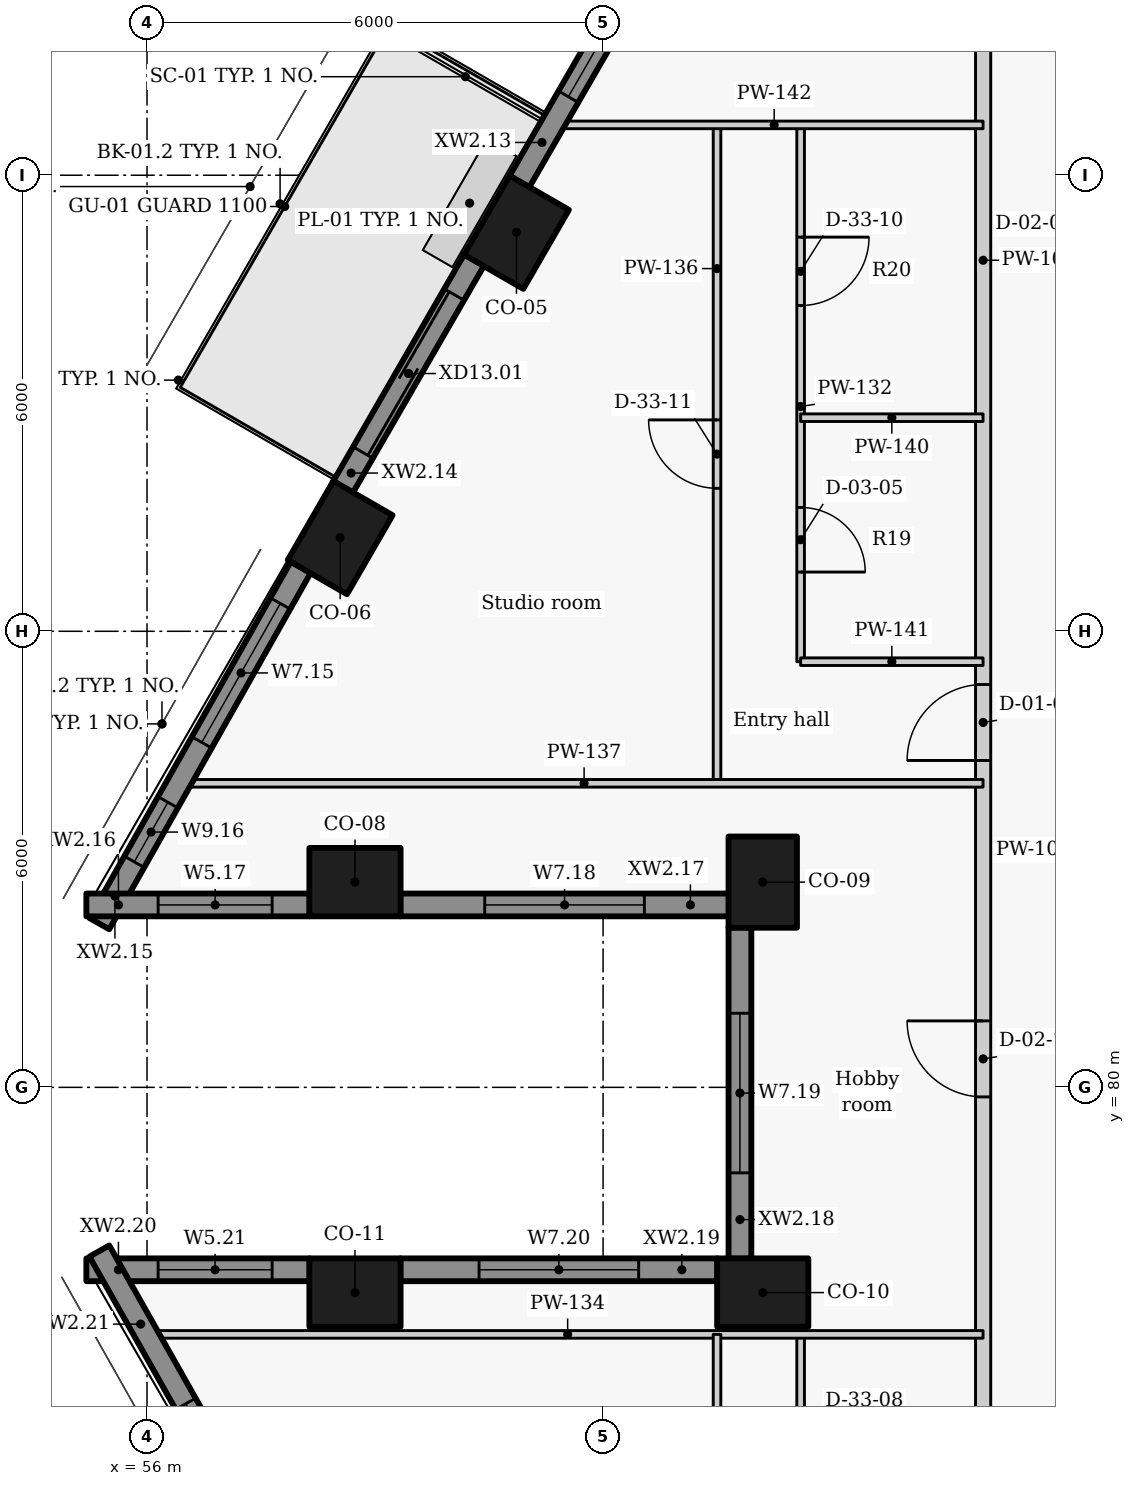
"""IFC4 building model, lengths in metres.
Left out: names, types, materials, properties, quantities, classifications, styles, units other than length and angle.
Written with IfcOpenShell. Run it as: python <this file> out.ifc"""

import sys

from ifc_helpers import new_model, si_unit, direction, frame, frame_2d, origin, origin_2d, place, context, subcontext, project, spatial, rectangle, extrude, element, fill, save


model = new_model("IFC4")
c1 = context("Model", 3, precision=1e-05, world=origin(), true_north=direction((0.0, 1.0)))
c2 = subcontext(c1, "Body", "Model", "MODEL_VIEW")
j1 = project(units=[si_unit("LENGTHUNIT", "METRE"), si_unit("PLANEANGLEUNIT", "RADIAN")], contexts=[c1])
p1 = place(None, origin())
s1 = spatial("IfcSite", under=j1, at=p1, CompositionType="ELEMENT")
p2 = place(p1, origin())
s2 = spatial("IfcBuilding", under=s1, at=p2, CompositionType="ELEMENT")
p3 = place(p2, frame((0.0, 0.0, 203.1)))
s3 = spatial("IfcBuildingStorey", under=s2, at=p3, CompositionType="ELEMENT", Elevation=203.1)
for number, where, z_axis, x_axis in (
    (1, (60.861, 91.25, 0.0), (0.0, 0.0, 1.0), (-0.5, -0.866, 0.0)),
    (2, (58.541, 87.232, 0.0), (0.0, 0.0, 1.0), (-0.5, -0.866, 0.0)),
    (3, (58.736, 82.7, 0.0), (0.0, 0.0, 1.0), (1.0, 0.0, 0.0)),
    (4, (64.101, 82.7, 0.0), (0.0, 0.0, 1.0), (0.0, -1.0, 0.0)),
    (5, (64.101, 77.3, 0.0), (0.0, 0.0, 1.0), (-1.0, 0.0, 0.0)),
    (6, (58.736, 77.3, 0.0), (0.0, 0.0, 1.0), (-1.0, 0.0, 0.0)),
):
    element("IfcColumn", number, at=place(p3, frame(where, z_axis=z_axis, x_axis=x_axis)), inside=s3, PredefinedType="COLUMN", context=c2, shape_type="SweptSolid", body=[
        extrude(rectangle(XDim=1.2, YDim=0.9, at=origin_2d()), origin(), (0.0, 0.0, 1.0), 3.3),
    ])
p4 = place(p3, frame((62.771, 95.158, 0.0), z_axis=(0.0, 0.0, 1.0), x_axis=(-0.500059225181, -0.86599120741, 0.0)))
e7 = element("IfcWall", 7, at=p4, inside=s3, PredefinedType="SOLIDWALL", context=c2, shape_type="SweptSolid", body=[
    extrude(rectangle(XDim=3.744, YDim=0.3, at=frame_2d((1.872, 0.0))), origin(), (0.0, 0.0, 1.0), 2.425),
])
p5 = place(p4, frame((0.354, 0.0, 0.9)))
e8 = element("IfcOpeningElement", 8, at=p5, cuts=e7, PredefinedType="OPENING", context=c2, shape_type="SweptSolid", body=[
    extrude(rectangle(XDim=2.1, YDim=1.1, at=frame_2d((1.05, 0.55))), frame((0.0, 0.16, 0.0), z_axis=(0.0, -1.0, 0.0), x_axis=(1.0, 0.0, 0.0)), (0.0, 0.0, 1.0), 0.32),
])
p6 = place(p3, frame((60.303, 90.884, 0.0), z_axis=(0.0, 0.0, 1.0), x_axis=(-0.499955427682, -0.866051136095, 0.0)))
e9 = element("IfcWall", 9, at=p6, inside=s3, PredefinedType="SOLIDWALL", context=c2, shape_type="SweptSolid", body=[
    extrude(rectangle(XDim=3.447, YDim=0.3, at=frame_2d((1.724, 0.0))), origin(), (0.0, 0.0, 1.0), 2.425),
])
p7 = place(p6, frame((0.523, 0.0, 0.0)))
e10 = element("IfcOpeningElement", 10, at=p7, cuts=e9, PredefinedType="OPENING", context=c2, shape_type="SweptSolid", body=[
    extrude(rectangle(XDim=2.4, YDim=2.0, at=frame_2d((1.2, 1.0))), frame((0.0, 0.16, 0.0), z_axis=(0.0, -1.0, 0.0), x_axis=(1.0, 0.0, 0.0)), (0.0, 0.0, 1.0), 0.32),
])
p8 = place(p3, frame((58.023, 86.843, 0.0), z_axis=(0.0, 0.0, 1.0), x_axis=(-0.492033360928, -0.870576344575, 0.0)))
e11 = element("IfcWall", 11, at=p8, inside=s3, PredefinedType="SOLIDWALL", context=c2, shape_type="SweptSolid", body=[
    extrude(rectangle(XDim=5.387, YDim=0.3, at=frame_2d((2.693, 0.0))), origin(), (0.0, 0.0, 1.0), 2.425),
])
p9 = place(p8, frame((0.548, 0.0, 0.9)))
e12 = element("IfcOpeningElement", 12, at=p9, cuts=e11, PredefinedType="OPENING", context=c2, shape_type="SweptSolid", body=[
    extrude(rectangle(XDim=2.1, YDim=1.1, at=frame_2d((1.05, 0.55))), frame((0.0, 0.16, 0.0), z_axis=(0.0, -1.0, 0.0), x_axis=(1.0, 0.0, 0.0)), (0.0, 0.0, 1.0), 0.32),
])
p10 = place(p8, frame((3.552, 0.0, 0.9)))
e13 = element("IfcOpeningElement", 13, at=p10, cuts=e11, PredefinedType="OPENING", context=c2, shape_type="SweptSolid", body=[
    extrude(rectangle(XDim=0.9, YDim=1.1, at=frame_2d((0.45, 0.55))), frame((0.0, 0.16, 0.0), z_axis=(0.0, -1.0, 0.0), x_axis=(1.0, 0.0, 0.0)), (0.0, 0.0, 1.0), 0.32),
])
p11 = place(p3, frame((55.202, 82.4, 0.0), z_axis=(0.0, 0.0, 1.0), x_axis=(1.0, 0.0, 0.0)))
e14 = element("IfcWall", 14, at=p11, inside=s3, PredefinedType="SOLIDWALL", context=c2, shape_type="SweptSolid", body=[
    extrude(rectangle(XDim=2.938, YDim=0.3, at=frame_2d((1.469, 0.0))), origin(), (0.0, 0.0, 1.0), 2.425),
])
p12 = place(p11, frame((0.944, 0.0, 0.9)))
e15 = element("IfcOpeningElement", 15, at=p12, cuts=e14, PredefinedType="OPENING", context=c2, shape_type="SweptSolid", body=[
    extrude(rectangle(XDim=1.5, YDim=1.1, at=frame_2d((0.75, 0.55))), frame((0.0, 0.16, 0.0), z_axis=(0.0, -1.0, 0.0), x_axis=(1.0, 0.0, 0.0)), (0.0, 0.0, 1.0), 0.32),
])
p13 = place(p3, frame((59.332, 82.4, 0.0), z_axis=(0.0, 0.0, 1.0), x_axis=(1.0, 0.0, 0.0)))
e16 = element("IfcWall", 16, at=p13, inside=s3, PredefinedType="SOLIDWALL", context=c2, shape_type="SweptSolid", body=[
    extrude(rectangle(XDim=4.323, YDim=0.3, at=frame_2d((2.161, 0.0))), origin(), (0.0, 0.0, 1.0), 2.425),
])
p14 = place(p13, frame((1.111, 0.0, 0.9)))
e17 = element("IfcOpeningElement", 17, at=p14, cuts=e16, PredefinedType="OPENING", context=c2, shape_type="SweptSolid", body=[
    extrude(rectangle(XDim=2.1, YDim=1.1, at=frame_2d((1.05, 0.55))), frame((0.0, 0.16, 0.0), z_axis=(0.0, -1.0, 0.0), x_axis=(1.0, 0.0, 0.0)), (0.0, 0.0, 1.0), 0.32),
])
p15 = place(p3, frame((63.801, 82.104, 0.0), z_axis=(0.0, 0.0, 1.0), x_axis=(0.0, -1.0, 0.0)))
e18 = element("IfcWall", 18, at=p15, inside=s3, PredefinedType="SOLIDWALL", context=c2, shape_type="SweptSolid", body=[
    extrude(rectangle(XDim=4.358, YDim=0.3, at=frame_2d((2.179, 0.0))), origin(), (0.0, 0.0, 1.0), 2.425),
])
p16 = place(p15, frame((1.129, 0.0, 0.9)))
e19 = element("IfcOpeningElement", 19, at=p16, cuts=e18, PredefinedType="OPENING", context=c2, shape_type="SweptSolid", body=[
    extrude(rectangle(XDim=2.1, YDim=1.1, at=frame_2d((1.05, 0.55))), frame((0.0, 0.16, 0.0), z_axis=(0.0, -1.0, 0.0), x_axis=(1.0, 0.0, 0.0)), (0.0, 0.0, 1.0), 0.32),
])
p17 = place(p3, frame((63.504, 77.6, 0.0), z_axis=(0.0, 0.0, 1.0), x_axis=(-1.0, 0.0, 0.0)))
e20 = element("IfcWall", 20, at=p17, inside=s3, PredefinedType="SOLIDWALL", context=c2, shape_type="SweptSolid", body=[
    extrude(rectangle(XDim=4.172, YDim=0.3, at=frame_2d((2.086, 0.0))), origin(), (0.0, 0.0, 1.0), 2.425),
])
p18 = place(p17, frame((1.036, 0.0, 0.9)))
e21 = element("IfcOpeningElement", 21, at=p18, cuts=e20, PredefinedType="OPENING", context=c2, shape_type="SweptSolid", body=[
    extrude(rectangle(XDim=2.1, YDim=1.1, at=frame_2d((1.05, 0.55))), frame((0.0, 0.16, 0.0), z_axis=(0.0, -1.0, 0.0), x_axis=(1.0, 0.0, 0.0)), (0.0, 0.0, 1.0), 0.32),
])
p19 = place(p3, frame((58.14, 77.6, 0.0), z_axis=(0.0, 0.0, 1.0), x_axis=(-1.0, 0.0, 0.0)))
e22 = element("IfcWall", 22, at=p19, inside=s3, PredefinedType="SOLIDWALL", context=c2, shape_type="SweptSolid", body=[
    extrude(rectangle(XDim=2.938, YDim=0.3, at=frame_2d((1.469, 0.0))), origin(), (0.0, 0.0, 1.0), 2.425),
])
p20 = place(p19, frame((0.494, 0.0, 0.9)))
e23 = element("IfcOpeningElement", 23, at=p20, cuts=e22, PredefinedType="OPENING", context=c2, shape_type="SweptSolid", body=[
    extrude(rectangle(XDim=1.5, YDim=1.1, at=frame_2d((0.75, 0.55))), frame((0.0, 0.16, 0.0), z_axis=(0.0, -1.0, 0.0), x_axis=(1.0, 0.0, 0.0)), (0.0, 0.0, 1.0), 0.32),
])
p21 = place(p3, frame((55.373, 77.846, 0.0), z_axis=(0.0, 0.0, 1.0), x_axis=(0.492033360928, -0.870576344575, 0.0)))
e24 = element("IfcWall", 24, at=p21, inside=s3, PredefinedType="SOLIDWALL", context=c2, shape_type="SweptSolid", body=[
    extrude(rectangle(XDim=5.387, YDim=0.3, at=frame_2d((2.693, 0.0))), origin(), (0.0, 0.0, 1.0), 2.425),
])
p22 = place(p21, frame((2.308, 0.0, 0.9)))
e25 = element("IfcOpeningElement", 25, at=p22, cuts=e24, PredefinedType="OPENING", context=c2, shape_type="SweptSolid", body=[
    extrude(rectangle(XDim=2.1, YDim=1.1, at=frame_2d((1.05, 0.55))), frame((0.0, 0.16, 0.0), z_axis=(0.0, -1.0, 0.0), x_axis=(1.0, 0.0, 0.0)), (0.0, 0.0, 1.0), 0.32),
])
p23 = place(p3, frame((67.0, 58.674, 0.0), z_axis=(0.0, 0.0, 1.0), x_axis=(0.0, 1.0, 0.0)))
e26 = element("IfcWall", 26, at=p23, inside=s3, PredefinedType="PARTITIONING", context=c2, shape_type="SweptSolid", body=[
    extrude(rectangle(XDim=42.592, YDim=0.2, at=frame_2d((21.296, 0.0))), origin(), (0.0, 0.0, 1.0), 2.405),
])
p24 = place(p23, frame((2.376, 0.0, 0.0)))
e27 = element("IfcOpeningElement", 27, at=p24, cuts=e26, PredefinedType="OPENING", context=c2, shape_type="SweptSolid", body=[
    extrude(rectangle(XDim=1.0, YDim=2.1, at=frame_2d((0.5, 1.05))), frame((0.0, 0.11, 0.0), z_axis=(0.0, -1.0, 0.0), x_axis=(1.0, 0.0, 0.0)), (0.0, 0.0, 1.0), 0.22),
])
p25 = place(p23, frame((11.126, 0.0, 0.0)))
e28 = element("IfcOpeningElement", 28, at=p25, cuts=e26, PredefinedType="OPENING", context=c2, shape_type="SweptSolid", body=[
    extrude(rectangle(XDim=1.0, YDim=2.1, at=frame_2d((0.5, 1.05))), frame((0.0, 0.11, 0.0), z_axis=(0.0, -1.0, 0.0), x_axis=(1.0, 0.0, 0.0)), (0.0, 0.0, 1.0), 0.22),
])
p26 = place(p23, frame((25.626, 0.0, 0.0)))
e29 = element("IfcOpeningElement", 29, at=p26, cuts=e26, PredefinedType="OPENING", context=c2, shape_type="SweptSolid", body=[
    extrude(rectangle(XDim=1.0, YDim=2.1, at=frame_2d((0.5, 1.05))), frame((0.0, 0.11, 0.0), z_axis=(0.0, -1.0, 0.0), x_axis=(1.0, 0.0, 0.0)), (0.0, 0.0, 1.0), 0.22),
])
p27 = place(p23, frame((21.2, 0.0, 0.0)))
e30 = element("IfcOpeningElement", 30, at=p27, cuts=e26, PredefinedType="OPENING", context=c2, shape_type="SweptSolid", body=[
    extrude(rectangle(XDim=1.0, YDim=2.1, at=frame_2d((0.5, 1.05))), frame((0.0, 0.11, 0.0), z_axis=(0.0, -1.0, 0.0), x_axis=(1.0, 0.0, 0.0)), (0.0, 0.0, 1.0), 0.22),
])
p28 = place(p23, frame((37.788, 0.0, 0.0)))
e31 = element("IfcOpeningElement", 31, at=p28, cuts=e26, PredefinedType="OPENING", context=c2, shape_type="SweptSolid", body=[
    extrude(rectangle(XDim=1.0, YDim=2.1, at=frame_2d((0.5, 1.05))), frame((0.0, 0.11, 0.0), z_axis=(0.0, -1.0, 0.0), x_axis=(1.0, 0.0, 0.0)), (0.0, 0.0, 1.0), 0.22),
])
p29 = place(p3, frame((64.599, 76.75, 0.0), z_axis=(0.0, 0.0, 1.0), x_axis=(0.0, -1.0, 0.0)))
e32 = element("IfcWall", 32, at=p29, inside=s3, PredefinedType="PARTITIONING", context=c2, shape_type="SweptSolid", body=[
    extrude(rectangle(XDim=5.65, YDim=0.1, at=frame_2d((2.825, 0.0))), origin(), (0.0, 0.0, 1.0), 3.025),
])
p30 = place(p29, frame((3.941, 0.0, 0.0)))
e33 = element("IfcOpeningElement", 33, at=p30, cuts=e32, PredefinedType="OPENING", context=c2, shape_type="SweptSolid", body=[
    extrude(rectangle(XDim=0.85, YDim=2.1, at=frame_2d((0.425, 1.05))), frame((0.0, 0.06, 0.0), z_axis=(0.0, -1.0, 0.0), x_axis=(1.0, 0.0, 0.0)), (0.0, 0.0, 1.0), 0.12),
])
p31 = place(p29, frame((1.091, 0.0, 0.0)))
e34 = element("IfcOpeningElement", 34, at=p31, cuts=e32, PredefinedType="OPENING", context=c2, shape_type="SweptSolid", body=[
    extrude(rectangle(XDim=0.9, YDim=2.1, at=frame_2d((0.45, 1.05))), frame((0.0, 0.06, 0.0), z_axis=(0.0, -1.0, 0.0), x_axis=(1.0, 0.0, 0.0)), (0.0, 0.0, 1.0), 0.12),
])
p32 = place(p3, frame((64.599, 92.663, 0.0), z_axis=(0.0, 0.0, 1.0), x_axis=(0.0, -1.0, 0.0)))
e35 = element("IfcWall", 35, at=p32, inside=s3, PredefinedType="PARTITIONING", context=c2, shape_type="SweptSolid", body=[
    extrude(rectangle(XDim=7.062, YDim=0.1, at=frame_2d((3.531, 0.0))), origin(), (0.0, 0.0, 1.0), 3.025),
])
p33 = place(p32, frame((5.033, 0.0, 0.0)))
e36 = element("IfcOpeningElement", 36, at=p33, cuts=e35, PredefinedType="OPENING", context=c2, shape_type="SweptSolid", body=[
    extrude(rectangle(XDim=0.85, YDim=2.1, at=frame_2d((0.425, 1.05))), frame((0.0, 0.06, 0.0), z_axis=(0.0, -1.0, 0.0), x_axis=(1.0, 0.0, 0.0)), (0.0, 0.0, 1.0), 0.12),
])
p34 = place(p32, frame((1.477, 0.0, 0.0)))
e37 = element("IfcOpeningElement", 37, at=p34, cuts=e35, PredefinedType="OPENING", context=c2, shape_type="SweptSolid", body=[
    extrude(rectangle(XDim=0.9, YDim=2.1, at=frame_2d((0.45, 1.05))), frame((0.0, 0.06, 0.0), z_axis=(0.0, -1.0, 0.0), x_axis=(1.0, 0.0, 0.0)), (0.0, 0.0, 1.0), 0.12),
])
p35 = place(p3, frame((56.069, 76.75, 0.0), z_axis=(0.0, 0.0, 1.0), x_axis=(1.0, 0.0, 0.0)))
e38 = element("IfcWall", 38, at=p35, inside=s3, PredefinedType="PARTITIONING", context=c2, shape_type="SweptSolid", body=[
    extrude(rectangle(XDim=10.93, YDim=0.1, at=frame_2d((5.465, 0.0))), origin(), (0.0, 0.0, 1.0), 2.405),
])
p36 = place(p3, frame((63.499, 69.5, 0.0), z_axis=(0.0, 0.0, 1.0), x_axis=(0.0, 1.0, 0.0)))
e39 = element("IfcWall", 39, at=p36, inside=s3, PredefinedType="PARTITIONING", context=c2, shape_type="SweptSolid", body=[
    extrude(rectangle(XDim=7.25, YDim=0.1, at=frame_2d((3.625, 0.0))), origin(), (0.0, 0.0, 1.0), 3.025),
])
p37 = place(p36, frame((3.175, 0.0, 0.0)))
e40 = element("IfcOpeningElement", 40, at=p37, cuts=e39, PredefinedType="OPENING", context=c2, shape_type="SweptSolid", body=[
    extrude(rectangle(XDim=0.9, YDim=2.1, at=frame_2d((0.45, 1.05))), frame((0.0, 0.06, 0.0), z_axis=(0.0, -1.0, 0.0), x_axis=(1.0, 0.0, 0.0)), (0.0, 0.0, 1.0), 0.12),
])
p38 = place(p3, frame((63.499, 84.0, 0.0), z_axis=(0.0, 0.0, 1.0), x_axis=(0.0, 1.0, 0.0)))
e41 = element("IfcWall", 41, at=p38, inside=s3, PredefinedType="PARTITIONING", context=c2, shape_type="SweptSolid", body=[
    extrude(rectangle(XDim=8.663, YDim=0.1, at=frame_2d((4.331, 0.0))), origin(), (0.0, 0.0, 1.0), 3.025),
])
p39 = place(p38, frame((3.881, 0.0, 0.0)))
e42 = element("IfcOpeningElement", 42, at=p39, cuts=e41, PredefinedType="OPENING", context=c2, shape_type="SweptSolid", body=[
    extrude(rectangle(XDim=0.9, YDim=2.1, at=frame_2d((0.45, 1.05))), frame((0.0, 0.06, 0.0), z_axis=(0.0, -1.0, 0.0), x_axis=(1.0, 0.0, 0.0)), (0.0, 0.0, 1.0), 0.12),
])
p40 = place(p3, frame((56.502, 84.0, 0.0), z_axis=(0.0, 0.0, 1.0), x_axis=(1.0, 0.0, 0.0)))
e43 = element("IfcWall", 43, at=p40, inside=s3, PredefinedType="PARTITIONING", context=c2, shape_type="SweptSolid", body=[
    extrude(rectangle(XDim=10.497, YDim=0.1, at=frame_2d((5.249, 0.0))), origin(), (0.0, 0.0, 1.0), 2.405),
])
for number, where, z_axis, x_axis in (
    (44, (64.599, 88.81, 0.0), (0.0, 0.0, 1.0), (1.0, 0.0, 0.0)),
    (45, (64.599, 85.6, 0.0), (0.0, 0.0, 1.0), (1.0, 0.0, 0.0)),
):
    element("IfcWall", number, at=place(p3, frame(where, z_axis=z_axis, x_axis=x_axis)), inside=s3, PredefinedType="PARTITIONING", context=c2, shape_type="SweptSolid", body=[
        extrude(rectangle(XDim=2.4, YDim=0.1, at=frame_2d((1.2, 0.0))), origin(), (0.0, 0.0, 1.0), 3.025),
    ])
p41 = place(p3, frame((61.503, 92.662, 0.0), z_axis=(0.0, 0.0, 1.0), x_axis=(1.0, 0.0, 0.0)))
e46 = element("IfcWall", 46, at=p41, inside=s3, PredefinedType="PARTITIONING", context=c2, shape_type="SweptSolid", body=[
    extrude(rectangle(XDim=5.496, YDim=0.1, at=frame_2d((2.748, 0.0))), origin(), (0.0, 0.0, 1.0), 2.405),
])
p42 = place(p5, origin())
e47 = element("IfcWindow", 47, at=p42, inside=s3, PartitioningType="SINGLE_PANEL", PredefinedType="WINDOW", context=c2, shape_type="SweptSolid", body=[
    extrude(rectangle(XDim=2.1, YDim=1.1, at=frame_2d((1.05, 0.55))), frame((0.0, 0.03, 0.0), z_axis=(0.0, -1.0, 0.0), x_axis=(1.0, 0.0, 0.0)), (0.0, 0.0, 1.0), 0.06),
])
fill(e8, e47)
p43 = place(p7, origin())
e48 = element("IfcDoor", 48, at=p43, inside=s3, OperationType="DOUBLE_DOOR_SLIDING", PredefinedType="DOOR", context=c2, shape_type="SweptSolid", body=[
    extrude(rectangle(XDim=2.4, YDim=2.0, at=frame_2d((1.2, 1.0))), frame((0.0, 0.025, 0.0), z_axis=(0.0, -1.0, 0.0), x_axis=(1.0, 0.0, 0.0)), (0.0, 0.0, 1.0), 0.05),
])
fill(e10, e48)
p44 = place(p9, origin())
e49 = element("IfcWindow", 49, at=p44, inside=s3, PartitioningType="SINGLE_PANEL", PredefinedType="WINDOW", context=c2, shape_type="SweptSolid", body=[
    extrude(rectangle(XDim=2.1, YDim=1.1, at=frame_2d((1.05, 0.55))), frame((0.0, 0.03, 0.0), z_axis=(0.0, -1.0, 0.0), x_axis=(1.0, 0.0, 0.0)), (0.0, 0.0, 1.0), 0.06),
])
fill(e12, e49)
p45 = place(p10, origin())
e50 = element("IfcWindow", 50, at=p45, inside=s3, PartitioningType="SINGLE_PANEL", PredefinedType="WINDOW", context=c2, shape_type="SweptSolid", body=[
    extrude(rectangle(XDim=0.9, YDim=1.1, at=frame_2d((0.45, 0.55))), frame((0.0, 0.03, 0.0), z_axis=(0.0, -1.0, 0.0), x_axis=(1.0, 0.0, 0.0)), (0.0, 0.0, 1.0), 0.06),
])
fill(e13, e50)
p46 = place(p12, origin())
e51 = element("IfcWindow", 51, at=p46, inside=s3, PartitioningType="SINGLE_PANEL", PredefinedType="WINDOW", context=c2, shape_type="SweptSolid", body=[
    extrude(rectangle(XDim=1.5, YDim=1.1, at=frame_2d((0.75, 0.55))), frame((0.0, 0.03, 0.0), z_axis=(0.0, -1.0, 0.0), x_axis=(1.0, 0.0, 0.0)), (0.0, 0.0, 1.0), 0.06),
])
fill(e15, e51)
p47 = place(p14, origin())
e52 = element("IfcWindow", 52, at=p47, inside=s3, PartitioningType="SINGLE_PANEL", PredefinedType="WINDOW", context=c2, shape_type="SweptSolid", body=[
    extrude(rectangle(XDim=2.1, YDim=1.1, at=frame_2d((1.05, 0.55))), frame((0.0, 0.03, 0.0), z_axis=(0.0, -1.0, 0.0), x_axis=(1.0, 0.0, 0.0)), (0.0, 0.0, 1.0), 0.06),
])
fill(e17, e52)
p48 = place(p16, origin())
e53 = element("IfcWindow", 53, at=p48, inside=s3, PartitioningType="SINGLE_PANEL", PredefinedType="WINDOW", context=c2, shape_type="SweptSolid", body=[
    extrude(rectangle(XDim=2.1, YDim=1.1, at=frame_2d((1.05, 0.55))), frame((0.0, 0.03, 0.0), z_axis=(0.0, -1.0, 0.0), x_axis=(1.0, 0.0, 0.0)), (0.0, 0.0, 1.0), 0.06),
])
fill(e19, e53)
p49 = place(p18, origin())
e54 = element("IfcWindow", 54, at=p49, inside=s3, PartitioningType="SINGLE_PANEL", PredefinedType="WINDOW", context=c2, shape_type="SweptSolid", body=[
    extrude(rectangle(XDim=2.1, YDim=1.1, at=frame_2d((1.05, 0.55))), frame((0.0, 0.03, 0.0), z_axis=(0.0, -1.0, 0.0), x_axis=(1.0, 0.0, 0.0)), (0.0, 0.0, 1.0), 0.06),
])
fill(e21, e54)
p50 = place(p20, origin())
e55 = element("IfcWindow", 55, at=p50, inside=s3, PartitioningType="SINGLE_PANEL", PredefinedType="WINDOW", context=c2, shape_type="SweptSolid", body=[
    extrude(rectangle(XDim=1.5, YDim=1.1, at=frame_2d((0.75, 0.55))), frame((0.0, 0.03, 0.0), z_axis=(0.0, -1.0, 0.0), x_axis=(1.0, 0.0, 0.0)), (0.0, 0.0, 1.0), 0.06),
])
fill(e23, e55)
p51 = place(p22, origin())
e56 = element("IfcWindow", 56, at=p51, inside=s3, PartitioningType="SINGLE_PANEL", PredefinedType="WINDOW", context=c2, shape_type="SweptSolid", body=[
    extrude(rectangle(XDim=2.1, YDim=1.1, at=frame_2d((1.05, 0.55))), frame((0.0, 0.03, 0.0), z_axis=(0.0, -1.0, 0.0), x_axis=(1.0, 0.0, 0.0)), (0.0, 0.0, 1.0), 0.06),
])
fill(e25, e56)
p52 = place(p26, origin())
e57 = element("IfcDoor", 57, at=p52, inside=s3, OperationType="SINGLE_SWING_LEFT", PredefinedType="DOOR", context=c2, shape_type="SweptSolid", body=[
    extrude(rectangle(XDim=1.0, YDim=2.1, at=frame_2d((0.5, 1.05))), frame((0.0, 0.025, 0.0), z_axis=(0.0, -1.0, 0.0), x_axis=(1.0, 0.0, 0.0)), (0.0, 0.0, 1.0), 0.05),
])
fill(e29, e57)
p53 = place(p33, origin())
e58 = element("IfcDoor", 58, at=p53, inside=s3, OperationType="SINGLE_SWING_RIGHT", PredefinedType="DOOR", context=c2, shape_type="SweptSolid", body=[
    extrude(rectangle(XDim=0.85, YDim=2.1, at=frame_2d((0.425, 1.05))), frame((0.0, 0.025, 0.0), z_axis=(0.0, -1.0, 0.0), x_axis=(1.0, 0.0, 0.0)), (0.0, 0.0, 1.0), 0.05),
])
fill(e36, e58)
p54 = place(p34, origin())
e59 = element("IfcDoor", 59, at=p54, inside=s3, OperationType="SINGLE_SWING_LEFT", PredefinedType="DOOR", context=c2, shape_type="SweptSolid", body=[
    extrude(rectangle(XDim=0.9, YDim=2.1, at=frame_2d((0.45, 1.05))), frame((0.0, 0.025, 0.0), z_axis=(0.0, -1.0, 0.0), x_axis=(1.0, 0.0, 0.0)), (0.0, 0.0, 1.0), 0.05),
])
fill(e37, e59)
p55 = place(p39, origin())
e60 = element("IfcDoor", 60, at=p55, inside=s3, OperationType="SINGLE_SWING_RIGHT", PredefinedType="DOOR", context=c2, shape_type="SweptSolid", body=[
    extrude(rectangle(XDim=0.9, YDim=2.1, at=frame_2d((0.45, 1.05))), frame((0.0, 0.025, 0.0), z_axis=(0.0, -1.0, 0.0), x_axis=(1.0, 0.0, 0.0)), (0.0, 0.0, 1.0), 0.05),
])
fill(e42, e60)
p56 = place(p27, origin())
e61 = element("IfcDoor", 61, at=p56, inside=s3, OperationType="SINGLE_SWING_RIGHT", PredefinedType="DOOR", context=c2, shape_type="SweptSolid", body=[
    extrude(rectangle(XDim=1.0, YDim=2.1, at=frame_2d((0.5, 1.05))), frame((0.0, 0.025, 0.0), z_axis=(0.0, -1.0, 0.0), x_axis=(1.0, 0.0, 0.0)), (0.0, 0.0, 1.0), 0.05),
])
fill(e30, e61)
save(model, sys.argv[1])
